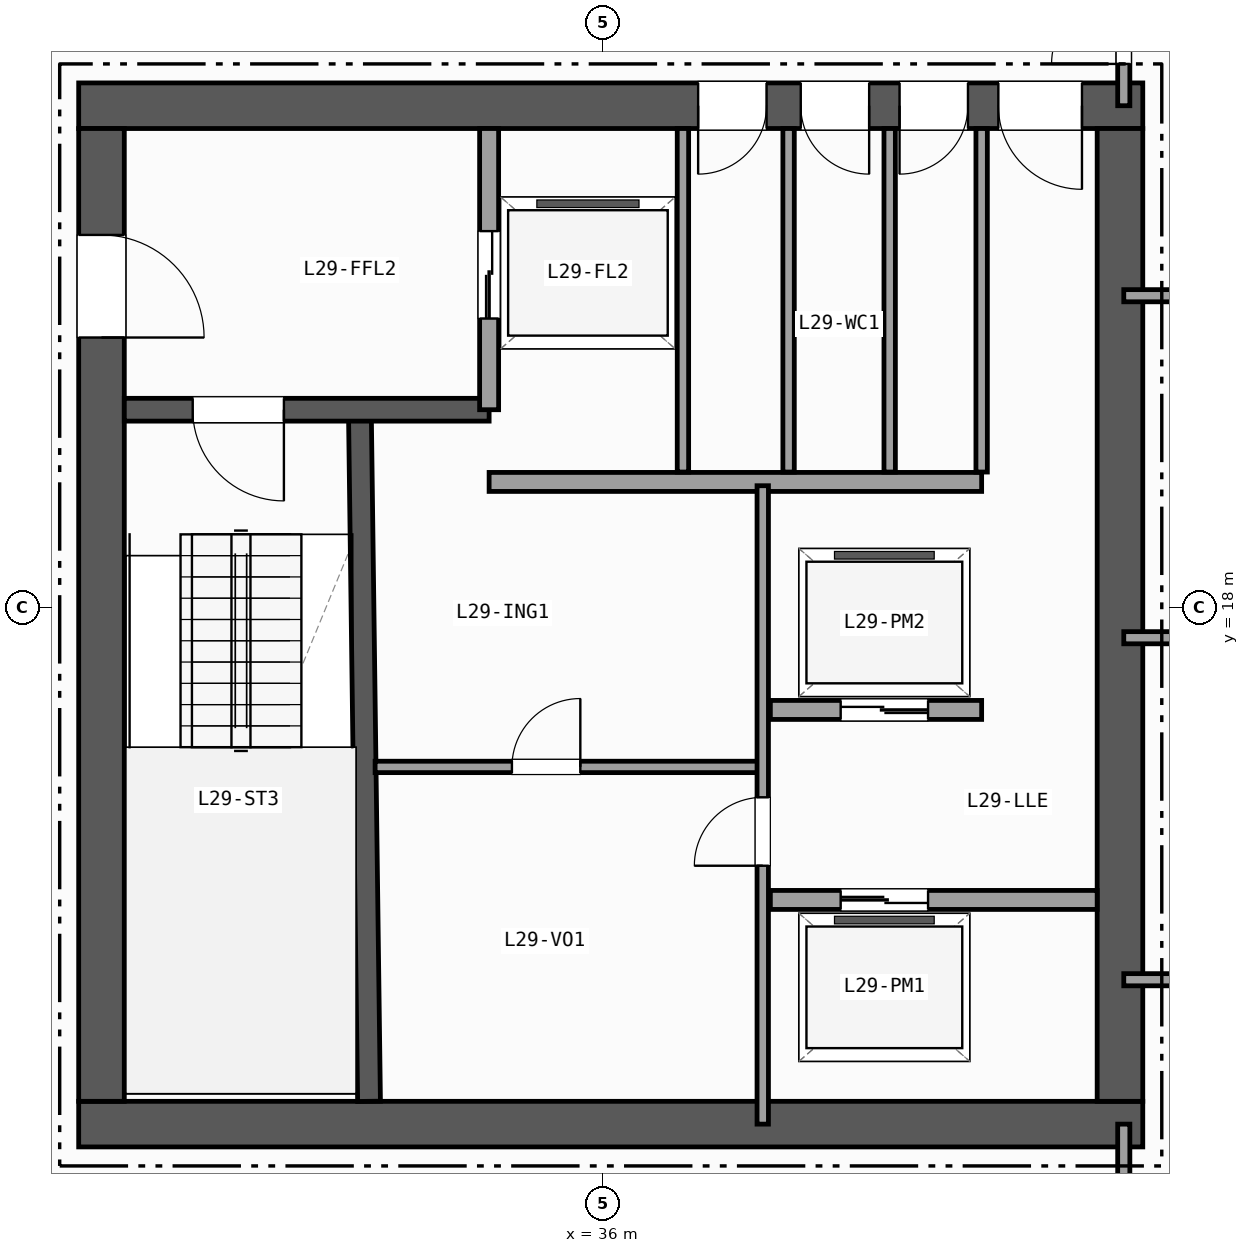
"""IFC4 building model, lengths in metres.
Left out: names, types, materials, properties, quantities, classifications, styles, units other than length and angle.
Written with IfcOpenShell. Run it as: python <this file> out.ifc"""

import sys

from ifc_helpers import new_model, si_unit, direction, frame, frame_2d, origin, place, context, subcontext, project, spatial, rectangle, extrude, element, fill, save


model = new_model("IFC4")
c1 = context("Model", 3, precision=1e-05, world=origin(), true_north=direction((0.0, 1.0)))
c2 = subcontext(c1, "Body", "Model", "MODEL_VIEW")
j1 = project(units=[si_unit("LENGTHUNIT", "METRE"), si_unit("PLANEANGLEUNIT", "RADIAN")], contexts=[c1])
p1 = place(None, origin())
s1 = spatial("IfcSite", under=j1, at=p1, CompositionType="ELEMENT")
p2 = place(p1, origin())
s2 = spatial("IfcBuilding", under=s1, at=p2, CompositionType="ELEMENT")
p3 = place(p2, frame((0.0, 0.0, 121.1)))
s3 = spatial("IfcBuildingStorey", under=s2, at=p3, CompositionType="ELEMENT", Elevation=121.1)
p4 = place(p3, frame((29.1, 11.2, 0.0), z_axis=(0.0, 0.0, 1.0), x_axis=(1.0, 0.0, 0.0)))
e1 = element("IfcWall", 1, at=p4, inside=s3, PredefinedType="SHEAR", context=c2, shape_type="SweptSolid", body=[
    extrude(rectangle(XDim=14.0, YDim=0.6, at=frame_2d((7.0, 0.0))), origin(), (0.0, 0.0, 1.0), 3.42),
])
p5 = place(p3, frame((43.1, 24.6, 0.0), z_axis=(0.0, 0.0, 1.0), x_axis=(-1.0, 0.0, 0.0)))
e2 = element("IfcWall", 2, at=p5, inside=s3, PredefinedType="SHEAR", context=c2, shape_type="SweptSolid", body=[
    extrude(rectangle(XDim=14.0, YDim=0.6, at=frame_2d((7.0, 0.0))), origin(), (0.0, 0.0, 1.0), 3.42),
])
p6 = place(p5, frame((0.8, 0.0, 0.0)))
e3 = element("IfcOpeningElement", 3, at=p6, cuts=e2, PredefinedType="OPENING", context=c2, shape_type="SweptSolid", body=[
    extrude(rectangle(XDim=1.1, YDim=2.15, at=frame_2d((0.55, 1.075))), frame((0.0, 0.31, 0.0), z_axis=(0.0, -1.0, 0.0), x_axis=(1.0, 0.0, 0.0)), (0.0, 0.0, 1.0), 0.62),
])
p7 = place(p5, frame((2.3, 0.0, 0.0)))
e4 = element("IfcOpeningElement", 4, at=p7, cuts=e2, PredefinedType="OPENING", context=c2, shape_type="SweptSolid", body=[
    extrude(rectangle(XDim=0.9, YDim=2.1, at=frame_2d((0.45, 1.05))), frame((0.0, 0.31, 0.0), z_axis=(0.0, -1.0, 0.0), x_axis=(1.0, 0.0, 0.0)), (0.0, 0.0, 1.0), 0.62),
])
p8 = place(p5, frame((3.6, 0.0, 0.0)))
e5 = element("IfcOpeningElement", 5, at=p8, cuts=e2, PredefinedType="OPENING", context=c2, shape_type="SweptSolid", body=[
    extrude(rectangle(XDim=0.9, YDim=2.1, at=frame_2d((0.45, 1.05))), frame((0.0, 0.31, 0.0), z_axis=(0.0, -1.0, 0.0), x_axis=(1.0, 0.0, 0.0)), (0.0, 0.0, 1.0), 0.62),
])
p9 = place(p5, frame((4.95, 0.0, 0.0)))
e6 = element("IfcOpeningElement", 6, at=p9, cuts=e2, PredefinedType="OPENING", context=c2, shape_type="SweptSolid", body=[
    extrude(rectangle(XDim=0.9, YDim=2.1, at=frame_2d((0.45, 1.05))), frame((0.0, 0.31, 0.0), z_axis=(0.0, -1.0, 0.0), x_axis=(1.0, 0.0, 0.0)), (0.0, 0.0, 1.0), 0.62),
])
p10 = place(p3, frame((29.4, 24.3, 0.0), z_axis=(0.0, 0.0, 1.0), x_axis=(0.0, -1.0, 0.0)))
e7 = element("IfcWall", 7, at=p10, inside=s3, PredefinedType="SHEAR", context=c2, shape_type="SweptSolid", body=[
    extrude(rectangle(XDim=12.8, YDim=0.6, at=frame_2d((6.4, 0.0))), origin(), (0.0, 0.0, 1.0), 3.42),
])
p11 = place(p10, frame((1.4, 0.0, 0.0)))
e8 = element("IfcOpeningElement", 8, at=p11, cuts=e7, PredefinedType="OPENING", context=c2, shape_type="SweptSolid", body=[
    extrude(rectangle(XDim=1.35, YDim=2.15, at=frame_2d((0.675, 1.075))), frame((0.0, 0.31, 0.0), z_axis=(0.0, -1.0, 0.0), x_axis=(1.0, 0.0, 0.0)), (0.0, 0.0, 1.0), 0.62),
])
p12 = place(p3, frame((42.8, 11.5, 0.0), z_axis=(0.0, 0.0, 1.0), x_axis=(0.0, 1.0, 0.0)))
e9 = element("IfcWall", 9, at=p12, inside=s3, PredefinedType="SHEAR", context=c2, shape_type="SweptSolid", body=[
    extrude(rectangle(XDim=12.8, YDim=0.6, at=frame_2d((6.4, 0.0))), origin(), (0.0, 0.0, 1.0), 3.42),
])
p13 = place(p3, frame((32.92, 11.5, 0.0), z_axis=(0.0, 0.0, 1.0), x_axis=(-0.013244407292, 0.999912288991, 0.0)))
e10 = element("IfcWall", 10, at=p13, inside=s3, PredefinedType="SHEAR", context=c2, shape_type="SweptSolid", body=[
    extrude(rectangle(XDim=9.051, YDim=0.3, at=frame_2d((4.525, 0.0))), origin(), (0.0, 0.0, 1.0), 3.42),
])
p14 = place(p3, frame((34.5, 20.6, 0.0), z_axis=(0.0, 0.0, 1.0), x_axis=(-1.0, 0.0, 0.0)))
e11 = element("IfcWall", 11, at=p14, inside=s3, PredefinedType="SHEAR", context=c2, shape_type="SweptSolid", body=[
    extrude(rectangle(XDim=4.8, YDim=0.3, at=frame_2d((2.4, 0.0))), origin(), (0.0, 0.0, 1.0), 3.42),
])
p15 = place(p14, frame((2.7, 0.0, 0.0)))
e12 = element("IfcOpeningElement", 12, at=p15, cuts=e11, PredefinedType="OPENING", context=c2, shape_type="SweptSolid", body=[
    extrude(rectangle(XDim=1.2, YDim=2.15, at=frame_2d((0.6, 1.075))), frame((0.0, 0.16, 0.0), z_axis=(0.0, -1.0, 0.0), x_axis=(1.0, 0.0, 0.0)), (0.0, 0.0, 1.0), 0.32),
])
p16 = place(p3, frame((34.5, 20.6, 0.0), z_axis=(0.0, 0.0, 1.0), x_axis=(0.0, 1.0, 0.0)))
e13 = element("IfcWall", 13, at=p16, inside=s3, PredefinedType="PARTITIONING", context=c2, shape_type="SweptSolid", body=[
    extrude(rectangle(XDim=3.7, YDim=0.25, at=frame_2d((1.85, 0.0))), origin(), (0.0, 0.0, 1.0), 3.42),
])
p17 = place(p16, frame((1.2, 0.0, 0.0)))
e14 = element("IfcOpeningElement", 14, at=p17, cuts=e13, PredefinedType="OPENING", context=c2, shape_type="SweptSolid", body=[
    extrude(rectangle(XDim=1.15, YDim=2.15, at=frame_2d((0.575, 1.075))), frame((0.0, 0.135, 0.0), z_axis=(0.0, -1.0, 0.0), x_axis=(1.0, 0.0, 0.0)), (0.0, 0.0, 1.0), 0.27),
])
p18 = place(p3, frame((34.5, 19.65, 0.0), z_axis=(0.0, 0.0, 1.0), x_axis=(1.0, 0.0, 0.0)))
e15 = element("IfcWall", 15, at=p18, inside=s3, PredefinedType="PARTITIONING", context=c2, shape_type="SweptSolid", body=[
    extrude(rectangle(XDim=6.48, YDim=0.25, at=frame_2d((3.24, 0.0))), origin(), (0.0, 0.0, 1.0), 3.42),
])
p19 = place(p3, frame((38.2, 14.15, 0.0), z_axis=(0.0, 0.0, 1.0), x_axis=(1.0, 0.0, 0.0)))
e16 = element("IfcWall", 16, at=p19, inside=s3, PredefinedType="PARTITIONING", context=c2, shape_type="SweptSolid", body=[
    extrude(rectangle(XDim=4.3, YDim=0.25, at=frame_2d((2.15, 0.0))), origin(), (0.0, 0.0, 1.0), 3.42),
])
p20 = place(p19, frame((0.925, 0.0, 0.0)))
e17 = element("IfcOpeningElement", 17, at=p20, cuts=e16, PredefinedType="OPENING", context=c2, shape_type="SweptSolid", body=[
    extrude(rectangle(XDim=1.15, YDim=2.15, at=frame_2d((0.575, 1.075))), frame((0.0, 0.135, 0.0), z_axis=(0.0, -1.0, 0.0), x_axis=(1.0, 0.0, 0.0)), (0.0, 0.0, 1.0), 0.27),
])
p21 = place(p3, frame((40.98, 16.65, 0.0), z_axis=(0.0, 0.0, 1.0), x_axis=(-1.0, 0.0, 0.0)))
e18 = element("IfcWall", 18, at=p21, inside=s3, PredefinedType="PARTITIONING", context=c2, shape_type="SweptSolid", body=[
    extrude(rectangle(XDim=2.78, YDim=0.25, at=frame_2d((1.39, 0.0))), origin(), (0.0, 0.0, 1.0), 3.42),
])
p22 = place(p21, frame((0.705, 0.0, 0.0)))
e19 = element("IfcOpeningElement", 19, at=p22, cuts=e18, PredefinedType="OPENING", context=c2, shape_type="SweptSolid", body=[
    extrude(rectangle(XDim=1.15, YDim=2.15, at=frame_2d((0.575, 1.075))), frame((0.0, 0.135, 0.0), z_axis=(0.0, -1.0, 0.0), x_axis=(1.0, 0.0, 0.0)), (0.0, 0.0, 1.0), 0.27),
])
p23 = place(p3, frame((33.0, 15.9, 0.0), z_axis=(0.0, 0.0, 1.0), x_axis=(1.0, 0.0, 0.0)))
e20 = element("IfcWall", 20, at=p23, inside=s3, PredefinedType="PARTITIONING", context=c2, shape_type="SweptSolid", body=[
    extrude(rectangle(XDim=5.1, YDim=0.15, at=frame_2d((2.55, 0.0))), origin(), (0.0, 0.0, 1.0), 3.42),
])
p24 = place(p23, frame((1.8, 0.0, 0.0)))
e21 = element("IfcOpeningElement", 21, at=p24, cuts=e20, PredefinedType="OPENING", context=c2, shape_type="SweptSolid", body=[
    extrude(rectangle(XDim=0.9, YDim=2.1, at=frame_2d((0.45, 1.05))), frame((0.0, 0.085, 0.0), z_axis=(0.0, -1.0, 0.0), x_axis=(1.0, 0.0, 0.0)), (0.0, 0.0, 1.0), 0.17),
])
p25 = place(p3, frame((38.1, 11.2, 0.0), z_axis=(0.0, 0.0, 1.0), x_axis=(0.0, 1.0, 0.0)))
e22 = element("IfcWall", 22, at=p25, inside=s3, PredefinedType="PARTITIONING", context=c2, shape_type="SweptSolid", body=[
    extrude(rectangle(XDim=8.4, YDim=0.15, at=frame_2d((4.2, 0.0))), origin(), (0.0, 0.0, 1.0), 3.42),
])
p26 = place(p25, frame((3.4, 0.0, 0.0)))
e23 = element("IfcOpeningElement", 23, at=p26, cuts=e22, PredefinedType="OPENING", context=c2, shape_type="SweptSolid", body=[
    extrude(rectangle(XDim=0.9, YDim=2.1, at=frame_2d((0.45, 1.05))), frame((0.0, 0.085, 0.0), z_axis=(0.0, -1.0, 0.0), x_axis=(1.0, 0.0, 0.0)), (0.0, 0.0, 1.0), 0.17),
])
for number, where, z_axis, x_axis in (
    (24, (37.05, 19.78, 0.0), (0.0, 0.0, 1.0), (0.0, 1.0, 0.0)),
    (25, (38.44, 19.78, 0.0), (0.0, 0.0, 1.0), (0.0, 1.0, 0.0)),
    (26, (39.77, 19.78, 0.0), (0.0, 0.0, 1.0), (0.0, 1.0, 0.0)),
    (27, (40.98, 19.78, 0.0), (0.0, 0.0, 1.0), (0.0, 1.0, 0.0)),
):
    element("IfcWall", number, at=place(p3, frame(where, z_axis=z_axis, x_axis=x_axis)), inside=s3, PredefinedType="PARTITIONING", context=c2, shape_type="SweptSolid", body=[
        extrude(rectangle(XDim=4.52, YDim=0.15, at=frame_2d((2.26, 0.0))), origin(), (0.0, 0.0, 1.0), 3.42),
    ])
p27 = place(p3, frame((42.85, 9.0, 0.0), z_axis=(0.0, 0.0, 1.0), x_axis=(0.0, 1.0, 0.0)))
e28 = element("IfcWall", 28, at=p27, inside=s3, PredefinedType="PARTITIONING", context=c2, shape_type="SweptSolid", body=[
    extrude(rectangle(XDim=2.2, YDim=0.16, at=frame_2d((1.1, 0.0))), origin(), (0.0, 0.0, 1.0), 2.634),
])
p28 = place(p3, frame((42.85, 24.6, 0.0), z_axis=(0.0, 0.0, 1.0), x_axis=(0.0, 1.0, 0.0)))
e29 = element("IfcWall", 29, at=p28, inside=s3, PredefinedType="PARTITIONING", context=c2, shape_type="SweptSolid", body=[
    extrude(rectangle(XDim=2.4, YDim=0.16, at=frame_2d((1.2, 0.0))), origin(), (0.0, 0.0, 1.0), 2.634),
])
p29 = place(p28, frame((0.55, 0.0, 0.0)))
e30 = element("IfcOpeningElement", 30, at=p29, cuts=e29, PredefinedType="OPENING", context=c2, shape_type="SweptSolid", body=[
    extrude(rectangle(XDim=0.95, YDim=2.1, at=frame_2d((0.475, 1.05))), frame((0.0, 0.09, 0.0), z_axis=(0.0, -1.0, 0.0), x_axis=(1.0, 0.0, 0.0)), (0.0, 0.0, 1.0), 0.18),
])
p30 = place(p3, frame((42.85, 13.1, 0.0), z_axis=(0.0, 0.0, 1.0), x_axis=(1.0, 0.0, 0.0)))
e31 = element("IfcWall", 31, at=p30, inside=s3, PredefinedType="PARTITIONING", context=c2, shape_type="SweptSolid", body=[
    extrude(rectangle(XDim=11.653, YDim=0.16, at=frame_2d((5.826, 0.0))), origin(), (0.0, 0.0, 1.0), 3.42),
])
p31 = place(p30, frame((4.6, 0.0, 0.0)))
e32 = element("IfcOpeningElement", 32, at=p31, cuts=e31, PredefinedType="OPENING", context=c2, shape_type="SweptSolid", body=[
    extrude(rectangle(XDim=1.0, YDim=2.1, at=frame_2d((0.5, 1.05))), frame((0.0, 0.09, 0.0), z_axis=(0.0, -1.0, 0.0), x_axis=(1.0, 0.0, 0.0)), (0.0, 0.0, 1.0), 0.18),
])
p32 = place(p3, frame((42.85, 17.6, 0.0), z_axis=(0.0, 0.0, 1.0), x_axis=(1.0, 0.0, 0.0)))
e33 = element("IfcWall", 33, at=p32, inside=s3, PredefinedType="PARTITIONING", context=c2, shape_type="SweptSolid", body=[
    extrude(rectangle(XDim=11.15, YDim=0.16, at=frame_2d((5.575, 0.0))), origin(), (0.0, 0.0, 1.0), 3.42),
])
p33 = place(p32, frame((4.6, 0.0, 0.0)))
e34 = element("IfcOpeningElement", 34, at=p33, cuts=e33, PredefinedType="OPENING", context=c2, shape_type="SweptSolid", body=[
    extrude(rectangle(XDim=1.05, YDim=2.15, at=frame_2d((0.525, 1.075))), frame((0.0, 0.09, 0.0), z_axis=(0.0, -1.0, 0.0), x_axis=(1.0, 0.0, 0.0)), (0.0, 0.0, 1.0), 0.18),
])
p34 = place(p3, frame((42.85, 22.1, 0.0), z_axis=(0.0, 0.0, 1.0), x_axis=(1.0, 0.0, 0.0)))
e35 = element("IfcWall", 35, at=p34, inside=s3, PredefinedType="PARTITIONING", context=c2, shape_type="SweptSolid", body=[
    extrude(rectangle(XDim=11.865, YDim=0.16, at=frame_2d((5.933, 0.0))), origin(), (0.0, 0.0, 1.0), 3.42),
])
p35 = place(p34, frame((4.6, 0.0, 0.0)))
e36 = element("IfcOpeningElement", 36, at=p35, cuts=e35, PredefinedType="OPENING", context=c2, shape_type="SweptSolid", body=[
    extrude(rectangle(XDim=1.2, YDim=2.15, at=frame_2d((0.6, 1.075))), frame((0.0, 0.09, 0.0), z_axis=(0.0, -1.0, 0.0), x_axis=(1.0, 0.0, 0.0)), (0.0, 0.0, 1.0), 0.18),
])
p36 = place(p15, origin())
e37 = element("IfcDoor", 37, at=p36, inside=s3, OperationType="SINGLE_SWING_LEFT", PredefinedType="DOOR", context=c2, shape_type="SweptSolid", body=[
    extrude(rectangle(XDim=1.2, YDim=2.15, at=frame_2d((0.6, 1.075))), frame((0.0, 0.025, 0.0), z_axis=(0.0, -1.0, 0.0), x_axis=(1.0, 0.0, 0.0)), (0.0, 0.0, 1.0), 0.05),
])
fill(e12, e37)
p37 = place(p11, origin())
e38 = element("IfcDoor", 38, at=p37, inside=s3, OperationType="SINGLE_SWING_RIGHT", PredefinedType="DOOR", context=c2, shape_type="SweptSolid", body=[
    extrude(rectangle(XDim=1.35, YDim=2.15, at=frame_2d((0.675, 1.075))), frame((0.0, 0.025, 0.0), z_axis=(0.0, -1.0, 0.0), x_axis=(1.0, 0.0, 0.0)), (0.0, 0.0, 1.0), 0.05),
])
fill(e8, e38)
p38 = place(p6, origin())
e39 = element("IfcDoor", 39, at=p38, inside=s3, OperationType="SINGLE_SWING_LEFT", PredefinedType="DOOR", context=c2, shape_type="SweptSolid", body=[
    extrude(rectangle(XDim=1.1, YDim=2.15, at=frame_2d((0.55, 1.075))), frame((0.0, 0.025, 0.0), z_axis=(0.0, -1.0, 0.0), x_axis=(1.0, 0.0, 0.0)), (0.0, 0.0, 1.0), 0.05),
])
fill(e3, e39)
p39 = place(p7, origin())
e40 = element("IfcDoor", 40, at=p39, inside=s3, OperationType="SINGLE_SWING_RIGHT", PredefinedType="DOOR", context=c2, shape_type="SweptSolid", body=[
    extrude(rectangle(XDim=0.9, YDim=2.1, at=frame_2d((0.45, 1.05))), frame((0.0, 0.025, 0.0), z_axis=(0.0, -1.0, 0.0), x_axis=(1.0, 0.0, 0.0)), (0.0, 0.0, 1.0), 0.05),
])
fill(e4, e40)
p40 = place(p8, origin())
e41 = element("IfcDoor", 41, at=p40, inside=s3, OperationType="SINGLE_SWING_LEFT", PredefinedType="DOOR", context=c2, shape_type="SweptSolid", body=[
    extrude(rectangle(XDim=0.9, YDim=2.1, at=frame_2d((0.45, 1.05))), frame((0.0, 0.025, 0.0), z_axis=(0.0, -1.0, 0.0), x_axis=(1.0, 0.0, 0.0)), (0.0, 0.0, 1.0), 0.05),
])
fill(e5, e41)
p41 = place(p9, origin())
e42 = element("IfcDoor", 42, at=p41, inside=s3, OperationType="SINGLE_SWING_RIGHT", PredefinedType="DOOR", context=c2, shape_type="SweptSolid", body=[
    extrude(rectangle(XDim=0.9, YDim=2.1, at=frame_2d((0.45, 1.05))), frame((0.0, 0.025, 0.0), z_axis=(0.0, -1.0, 0.0), x_axis=(1.0, 0.0, 0.0)), (0.0, 0.0, 1.0), 0.05),
])
fill(e6, e42)
p42 = place(p17, origin())
e43 = element("IfcDoor", 43, at=p42, inside=s3, OperationType="DOUBLE_DOOR_SLIDING", PredefinedType="DOOR", context=c2, shape_type="SweptSolid", body=[
    extrude(rectangle(XDim=1.15, YDim=2.15, at=frame_2d((0.575, 1.075))), frame((0.0, 0.025, 0.0), z_axis=(0.0, -1.0, 0.0), x_axis=(1.0, 0.0, 0.0)), (0.0, 0.0, 1.0), 0.05),
])
fill(e14, e43)
p43 = place(p20, origin())
e44 = element("IfcDoor", 44, at=p43, inside=s3, OperationType="DOUBLE_DOOR_SLIDING", PredefinedType="DOOR", context=c2, shape_type="SweptSolid", body=[
    extrude(rectangle(XDim=1.15, YDim=2.15, at=frame_2d((0.575, 1.075))), frame((0.0, 0.025, 0.0), z_axis=(0.0, -1.0, 0.0), x_axis=(1.0, 0.0, 0.0)), (0.0, 0.0, 1.0), 0.05),
])
fill(e17, e44)
p44 = place(p22, origin())
e45 = element("IfcDoor", 45, at=p44, inside=s3, OperationType="DOUBLE_DOOR_SLIDING", PredefinedType="DOOR", context=c2, shape_type="SweptSolid", body=[
    extrude(rectangle(XDim=1.15, YDim=2.15, at=frame_2d((0.575, 1.075))), frame((0.0, 0.025, 0.0), z_axis=(0.0, -1.0, 0.0), x_axis=(1.0, 0.0, 0.0)), (0.0, 0.0, 1.0), 0.05),
])
fill(e19, e45)
p45 = place(p26, origin())
e46 = element("IfcDoor", 46, at=p45, inside=s3, OperationType="SINGLE_SWING_LEFT", PredefinedType="DOOR", context=c2, shape_type="SweptSolid", body=[
    extrude(rectangle(XDim=0.9, YDim=2.1, at=frame_2d((0.45, 1.05))), frame((0.0, 0.025, 0.0), z_axis=(0.0, -1.0, 0.0), x_axis=(1.0, 0.0, 0.0)), (0.0, 0.0, 1.0), 0.05),
])
fill(e23, e46)
p46 = place(p24, origin())
e47 = element("IfcDoor", 47, at=p46, inside=s3, OperationType="SINGLE_SWING_RIGHT", PredefinedType="DOOR", context=c2, shape_type="SweptSolid", body=[
    extrude(rectangle(XDim=0.9, YDim=2.1, at=frame_2d((0.45, 1.05))), frame((0.0, 0.025, 0.0), z_axis=(0.0, -1.0, 0.0), x_axis=(1.0, 0.0, 0.0)), (0.0, 0.0, 1.0), 0.05),
])
fill(e21, e47)
p47 = place(p29, origin())
e48 = element("IfcDoor", 48, at=p47, inside=s3, OperationType="SINGLE_SWING_LEFT", PredefinedType="DOOR", context=c2, shape_type="SweptSolid", body=[
    extrude(rectangle(XDim=0.95, YDim=2.1, at=frame_2d((0.475, 1.05))), frame((0.0, 0.025, 0.0), z_axis=(0.0, -1.0, 0.0), x_axis=(1.0, 0.0, 0.0)), (0.0, 0.0, 1.0), 0.05),
])
fill(e30, e48)
save(model, sys.argv[1])
